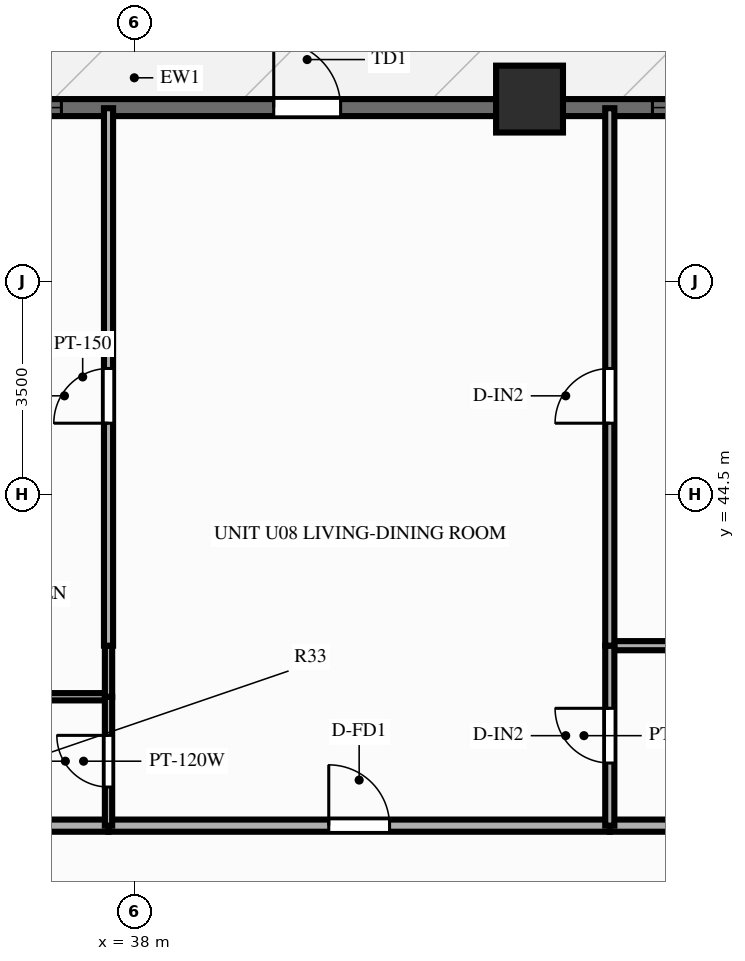
"""IFC4 building model, lengths in metres.
Left out: names, types, materials, properties, quantities, classifications, styles, units other than length and angle.
Written with IfcOpenShell. Run it as: python <this file> out.ifc"""

import sys

from ifc_helpers import new_model, si_unit, direction, frame, frame_2d, origin, origin_2d, place, context, subcontext, project, spatial, rectangle, extrude, source, transform, mapped, element, fill, save


model = new_model("IFC4")
c1 = context("Model", 3, precision=1e-05, world=origin(), true_north=direction((0.0, 1.0)))
c2 = subcontext(c1, "Body", "Model", "MODEL_VIEW")
j1 = project(units=[si_unit("LENGTHUNIT", "METRE"), si_unit("PLANEANGLEUNIT", "RADIAN")], contexts=[c1])
p1 = place(None, origin())
s1 = spatial("IfcSite", under=j1, at=p1, CompositionType="ELEMENT")
p2 = place(p1, origin())
s2 = spatial("IfcBuilding", under=s1, at=p2, CompositionType="ELEMENT")
p3 = place(p2, frame((0.0, 0.0, 61.4)))
s3 = spatial("IfcBuildingStorey", under=s2, at=p3, CompositionType="ELEMENT", Elevation=61.4)
m1 = source(origin(), c2, "Body", "SweptSolid", [
    extrude(rectangle(XDim=1.1, YDim=1.1, at=origin_2d()), origin(), (0.0, 0.0, 1.0), 3.0),
])
p4 = place(p3, frame((44.5, 51.0, 0.0), z_axis=(0.0, 0.0, 1.0), x_axis=(1.0, 0.0, 0.0)))
e1 = element("IfcColumn", 1, at=p4, inside=s3, PredefinedType="COLUMN", context=c2, shape_type="MappedRepresentation", body=[
    mapped(m1, transform((0.0, 0.0, 0.0), scale=1.0)),
])
p5 = place(p3, frame((15.5, 50.86, 0.0), z_axis=(0.0, 0.0, 1.0), x_axis=(1.0, 0.0, 0.0)))
e2 = element("IfcWall", 2, at=p5, inside=s3, PredefinedType="SOLIDWALL", context=c2, shape_type="SweptSolid", body=[
    extrude(rectangle(XDim=45.0, YDim=0.28, at=frame_2d((22.5, 0.0))), origin(), (0.0, 0.0, 1.0), 2.28),
])
p6 = place(p5, frame((0.76, 0.0, 0.25)))
e3 = element("IfcOpeningElement", 3, at=p6, cuts=e2, PredefinedType="OPENING", context=c2, shape_type="SweptSolid", body=[
    extrude(rectangle(XDim=1.2, YDim=1.5, at=frame_2d((0.6, 0.75))), frame((0.0, 0.152, 0.0), z_axis=(0.0, -1.0, 0.0), x_axis=(1.0, 0.0, 0.0)), (0.0, 0.0, 1.0), 0.304),
])
p7 = place(p5, frame((2.92, 0.0, 0.25)))
e4 = element("IfcOpeningElement", 4, at=p7, cuts=e2, PredefinedType="OPENING", context=c2, shape_type="SweptSolid", body=[
    extrude(rectangle(XDim=1.2, YDim=1.5, at=frame_2d((0.6, 0.75))), frame((0.0, 0.152, 0.0), z_axis=(0.0, -1.0, 0.0), x_axis=(1.0, 0.0, 0.0)), (0.0, 0.0, 1.0), 0.304),
])
p8 = place(p5, frame((5.554, 0.0, 0.25)))
e5 = element("IfcOpeningElement", 5, at=p8, cuts=e2, PredefinedType="OPENING", context=c2, shape_type="SweptSolid", body=[
    extrude(rectangle(XDim=1.2, YDim=1.5, at=frame_2d((0.6, 0.75))), frame((0.0, 0.152, 0.0), z_axis=(0.0, -1.0, 0.0), x_axis=(1.0, 0.0, 0.0)), (0.0, 0.0, 1.0), 0.304),
])
p9 = place(p5, frame((8.613, 0.0, 0.25)))
e6 = element("IfcOpeningElement", 6, at=p9, cuts=e2, PredefinedType="OPENING", context=c2, shape_type="SweptSolid", body=[
    extrude(rectangle(XDim=1.2, YDim=1.5, at=frame_2d((0.6, 0.75))), frame((0.0, 0.152, 0.0), z_axis=(0.0, -1.0, 0.0), x_axis=(1.0, 0.0, 0.0)), (0.0, 0.0, 1.0), 0.304),
])
p10 = place(p5, frame((11.418, 0.0, 0.25)))
e7 = element("IfcOpeningElement", 7, at=p10, cuts=e2, PredefinedType="OPENING", context=c2, shape_type="SweptSolid", body=[
    extrude(rectangle(XDim=1.2, YDim=1.5, at=frame_2d((0.6, 0.75))), frame((0.0, 0.152, 0.0), z_axis=(0.0, -1.0, 0.0), x_axis=(1.0, 0.0, 0.0)), (0.0, 0.0, 1.0), 0.304),
])
p11 = place(p5, frame((13.809, 0.0, 0.25)))
e8 = element("IfcOpeningElement", 8, at=p11, cuts=e2, PredefinedType="OPENING", context=c2, shape_type="SweptSolid", body=[
    extrude(rectangle(XDim=1.2, YDim=1.5, at=frame_2d((0.6, 0.75))), frame((0.0, 0.152, 0.0), z_axis=(0.0, -1.0, 0.0), x_axis=(1.0, 0.0, 0.0)), (0.0, 0.0, 1.0), 0.304),
])
p12 = place(p5, frame((17.258, 0.0, 0.25)))
e9 = element("IfcOpeningElement", 9, at=p12, cuts=e2, PredefinedType="OPENING", context=c2, shape_type="SweptSolid", body=[
    extrude(rectangle(XDim=1.2, YDim=1.5, at=frame_2d((0.6, 0.75))), frame((0.0, 0.152, 0.0), z_axis=(0.0, -1.0, 0.0), x_axis=(1.0, 0.0, 0.0)), (0.0, 0.0, 1.0), 0.304),
])
p13 = place(p5, frame((20.101, 0.0, 0.25)))
e10 = element("IfcOpeningElement", 10, at=p13, cuts=e2, PredefinedType="OPENING", context=c2, shape_type="SweptSolid", body=[
    extrude(rectangle(XDim=1.2, YDim=1.5, at=frame_2d((0.6, 0.75))), frame((0.0, 0.152, 0.0), z_axis=(0.0, -1.0, 0.0), x_axis=(1.0, 0.0, 0.0)), (0.0, 0.0, 1.0), 0.304),
])
p14 = place(p5, frame((24.793, 0.0, 0.0)))
e11 = element("IfcOpeningElement", 11, at=p14, cuts=e2, PredefinedType="OPENING", context=c2, shape_type="SweptSolid", body=[
    extrude(rectangle(XDim=1.1, YDim=2.15, at=frame_2d((0.55, 1.075))), frame((0.0, 0.152, 0.0), z_axis=(0.0, -1.0, 0.0), x_axis=(1.0, 0.0, 0.0)), (0.0, 0.0, 1.0), 0.304),
])
p15 = place(p5, frame((31.021, 0.0, 0.25)))
e12 = element("IfcOpeningElement", 12, at=p15, cuts=e2, PredefinedType="OPENING", context=c2, shape_type="SweptSolid", body=[
    extrude(rectangle(XDim=1.2, YDim=1.5, at=frame_2d((0.6, 0.75))), frame((0.0, 0.152, 0.0), z_axis=(0.0, -1.0, 0.0), x_axis=(1.0, 0.0, 0.0)), (0.0, 0.0, 1.0), 0.304),
])
p16 = place(p5, frame((33.869, 0.0, 0.25)))
e13 = element("IfcOpeningElement", 13, at=p16, cuts=e2, PredefinedType="OPENING", context=c2, shape_type="SweptSolid", body=[
    extrude(rectangle(XDim=1.2, YDim=1.5, at=frame_2d((0.6, 0.75))), frame((0.0, 0.152, 0.0), z_axis=(0.0, -1.0, 0.0), x_axis=(1.0, 0.0, 0.0)), (0.0, 0.0, 1.0), 0.304),
])
p17 = place(p5, frame((37.98, 0.0, 0.25)))
e14 = element("IfcOpeningElement", 14, at=p17, cuts=e2, PredefinedType="OPENING", context=c2, shape_type="SweptSolid", body=[
    extrude(rectangle(XDim=1.2, YDim=1.5, at=frame_2d((0.6, 0.75))), frame((0.0, 0.152, 0.0), z_axis=(0.0, -1.0, 0.0), x_axis=(1.0, 0.0, 0.0)), (0.0, 0.0, 1.0), 0.304),
])
p18 = place(p5, frame((42.277, 0.0, 0.25)))
e15 = element("IfcOpeningElement", 15, at=p18, cuts=e2, PredefinedType="OPENING", context=c2, shape_type="SweptSolid", body=[
    extrude(rectangle(XDim=1.2, YDim=1.5, at=frame_2d((0.6, 0.75))), frame((0.0, 0.152, 0.0), z_axis=(0.0, -1.0, 0.0), x_axis=(1.0, 0.0, 0.0)), (0.0, 0.0, 1.0), 0.304),
])
p19 = place(p3, frame((34.826, 39.05, 0.0), z_axis=(0.0, 0.0, 1.0), x_axis=(1.0, 0.0, 0.0)))
e16 = element("IfcWall", 16, at=p19, inside=s3, PredefinedType="PARTITIONING", context=c2, shape_type="SweptSolid", body=[
    extrude(rectangle(XDim=2.75, YDim=0.2, at=frame_2d((1.375, 0.0))), origin(), (0.0, 0.0, 1.0), 2.79),
])
p20 = place(p3, frame((37.576, 39.05, 0.0), z_axis=(0.0, 0.0, 1.0), x_axis=(1.0, 0.0, 0.0)))
e17 = element("IfcWall", 17, at=p20, inside=s3, PredefinedType="PARTITIONING", context=c2, shape_type="SweptSolid", body=[
    extrude(rectangle(XDim=8.244, YDim=0.2, at=frame_2d((4.122, 0.0))), origin(), (0.0, 0.0, 1.0), 2.79),
])
p21 = place(p20, frame((3.622, 0.0, 0.0)))
e18 = element("IfcOpeningElement", 18, at=p21, cuts=e17, PredefinedType="OPENING", context=c2, shape_type="SweptSolid", body=[
    extrude(rectangle(XDim=1.0, YDim=2.15, at=frame_2d((0.5, 1.075))), frame((0.0, 0.112, 0.0), z_axis=(0.0, -1.0, 0.0), x_axis=(1.0, 0.0, 0.0)), (0.0, 0.0, 1.0), 0.224),
])
p22 = place(p3, frame((45.82, 39.05, 0.0), z_axis=(0.0, 0.0, 1.0), x_axis=(1.0, 0.0, 0.0)))
e19 = element("IfcWall", 19, at=p22, inside=s3, PredefinedType="PARTITIONING", context=c2, shape_type="SweptSolid", body=[
    extrude(rectangle(XDim=2.603, YDim=0.2, at=frame_2d((1.301, 0.0))), origin(), (0.0, 0.0, 1.0), 2.79),
])
p23 = place(p3, frame((34.826, 41.17, 0.0), z_axis=(0.0, 0.0, 1.0), x_axis=(1.0, 0.0, 0.0)))
e20 = element("IfcWall", 20, at=p23, inside=s3, PredefinedType="PARTITIONING", context=c2, shape_type="SweptSolid", body=[
    extrude(rectangle(XDim=2.75, YDim=0.12, at=frame_2d((1.375, 0.0))), origin(), (0.0, 0.0, 1.0), 2.79),
])
p24 = place(p3, frame((45.82, 42.01, 0.0), z_axis=(0.0, 0.0, 1.0), x_axis=(1.0, 0.0, 0.0)))
e21 = element("IfcWall", 21, at=p24, inside=s3, PredefinedType="PARTITIONING", context=c2, shape_type="SweptSolid", body=[
    extrude(rectangle(XDim=2.603, YDim=0.15, at=frame_2d((1.301, 0.0))), origin(), (0.0, 0.0, 1.0), 2.79),
])
p25 = place(p3, frame((37.576, 39.05, 0.0), z_axis=(0.0, 0.0, 1.0), x_axis=(0.0, 1.0, 0.0)))
e22 = element("IfcWall", 22, at=p25, inside=s3, PredefinedType="PARTITIONING", context=c2, shape_type="SweptSolid", body=[
    extrude(rectangle(XDim=2.12, YDim=0.12, at=frame_2d((1.06, 0.0))), origin(), (0.0, 0.0, 1.0), 2.79),
])
p26 = place(p25, frame((0.635, 0.0, 0.0)))
e23 = element("IfcOpeningElement", 23, at=p26, cuts=e22, PredefinedType="OPENING", context=c2, shape_type="SweptSolid", body=[
    extrude(rectangle(XDim=0.85, YDim=2.05, at=frame_2d((0.425, 1.025))), frame((0.0, 0.072, 0.0), z_axis=(0.0, -1.0, 0.0), x_axis=(1.0, 0.0, 0.0)), (0.0, 0.0, 1.0), 0.144),
])
p27 = place(p3, frame((37.576, 41.17, 0.0), z_axis=(0.0, 0.0, 1.0), x_axis=(0.0, 1.0, 0.0)))
e24 = element("IfcWall", 24, at=p27, inside=s3, PredefinedType="PARTITIONING", context=c2, shape_type="SweptSolid", body=[
    extrude(rectangle(XDim=0.84, YDim=0.12, at=frame_2d((0.42, 0.0))), origin(), (0.0, 0.0, 1.0), 2.79),
])
p28 = place(p3, frame((37.576, 42.01, 0.0), z_axis=(0.0, 0.0, 1.0), x_axis=(0.0, 1.0, 0.0)))
e25 = element("IfcWall", 25, at=p28, inside=s3, PredefinedType="PARTITIONING", context=c2, shape_type="SweptSolid", body=[
    extrude(rectangle(XDim=8.84, YDim=0.15, at=frame_2d((4.42, 0.0))), origin(), (0.0, 0.0, 1.0), 2.79),
])
p29 = place(p28, frame((3.659, 0.0, 0.0)))
e26 = element("IfcOpeningElement", 26, at=p29, cuts=e25, PredefinedType="OPENING", context=c2, shape_type="SweptSolid", body=[
    extrude(rectangle(XDim=0.9, YDim=2.1, at=frame_2d((0.45, 1.05))), frame((0.0, 0.087, 0.0), z_axis=(0.0, -1.0, 0.0), x_axis=(1.0, 0.0, 0.0)), (0.0, 0.0, 1.0), 0.174),
])
p30 = place(p3, frame((45.82, 39.05, 0.0), z_axis=(0.0, 0.0, 1.0), x_axis=(0.0, 1.0, 0.0)))
e27 = element("IfcWall", 27, at=p30, inside=s3, PredefinedType="PARTITIONING", context=c2, shape_type="SweptSolid", body=[
    extrude(rectangle(XDim=2.96, YDim=0.15, at=frame_2d((1.48, 0.0))), origin(), (0.0, 0.0, 1.0), 2.79),
])
p31 = place(p30, frame((1.03, 0.0, 0.0)))
e28 = element("IfcOpeningElement", 28, at=p31, cuts=e27, PredefinedType="OPENING", context=c2, shape_type="SweptSolid", body=[
    extrude(rectangle(XDim=0.9, YDim=2.1, at=frame_2d((0.45, 1.05))), frame((0.0, 0.087, 0.0), z_axis=(0.0, -1.0, 0.0), x_axis=(1.0, 0.0, 0.0)), (0.0, 0.0, 1.0), 0.174),
])
p32 = place(p3, frame((45.82, 42.01, 0.0), z_axis=(0.0, 0.0, 1.0), x_axis=(0.0, 1.0, 0.0)))
e29 = element("IfcWall", 29, at=p32, inside=s3, PredefinedType="PARTITIONING", context=c2, shape_type="SweptSolid", body=[
    extrude(rectangle(XDim=8.84, YDim=0.15, at=frame_2d((4.42, 0.0))), origin(), (0.0, 0.0, 1.0), 2.79),
])
p33 = place(p32, frame((3.659, 0.0, 0.0)))
e30 = element("IfcOpeningElement", 30, at=p33, cuts=e29, PredefinedType="OPENING", context=c2, shape_type="SweptSolid", body=[
    extrude(rectangle(XDim=0.9, YDim=2.1, at=frame_2d((0.45, 1.05))), frame((0.0, 0.087, 0.0), z_axis=(0.0, -1.0, 0.0), x_axis=(1.0, 0.0, 0.0)), (0.0, 0.0, 1.0), 0.174),
])
m2 = source(origin(), c2, "Body", "SweptSolid", [
    extrude(rectangle(XDim=1.2, YDim=1.5, at=frame_2d((0.6, 0.75))), frame((0.0, 0.03, 0.0), z_axis=(0.0, -1.0, 0.0), x_axis=(1.0, 0.0, 0.0)), (0.0, 0.0, 1.0), 0.06),
])
p34 = place(p13, origin())
e31 = element("IfcWindow", 31, at=p34, inside=s3, PartitioningType="SINGLE_PANEL", PredefinedType="WINDOW", context=c2, shape_type="MappedRepresentation", body=[
    mapped(m2, transform((0.0, 0.0, 0.0), scale=1.0)),
])
fill(e10, e31)
m3 = source(origin(), c2, "Body", "SweptSolid", [
    extrude(rectangle(XDim=1.1, YDim=2.15, at=frame_2d((0.55, 1.075))), frame((0.0, 0.025, 0.0), z_axis=(0.0, -1.0, 0.0), x_axis=(1.0, 0.0, 0.0)), (0.0, 0.0, 1.0), 0.05),
])
p35 = place(p14, origin())
e32 = element("IfcDoor", 32, at=p35, inside=s3, OperationType="SINGLE_SWING_LEFT", PredefinedType="DOOR", context=c2, shape_type="MappedRepresentation", body=[
    mapped(m3, transform((0.0, 0.0, 0.0), scale=1.0)),
])
fill(e11, e32)
p36 = place(p15, origin())
e33 = element("IfcWindow", 33, at=p36, inside=s3, PartitioningType="SINGLE_PANEL", PredefinedType="WINDOW", context=c2, shape_type="MappedRepresentation", body=[
    mapped(m2, transform((0.0, 0.0, 0.0), scale=1.0)),
])
fill(e12, e33)
m4 = source(origin(), c2, "Body", "SweptSolid", [
    extrude(rectangle(XDim=1.0, YDim=2.15, at=frame_2d((0.5, 1.075))), frame((0.0, 0.025, 0.0), z_axis=(0.0, -1.0, 0.0), x_axis=(1.0, 0.0, 0.0)), (0.0, 0.0, 1.0), 0.05),
])
p37 = place(p21, origin())
e34 = element("IfcDoor", 34, at=p37, inside=s3, OperationType="SINGLE_SWING_LEFT", PredefinedType="DOOR", context=c2, shape_type="MappedRepresentation", body=[
    mapped(m4, transform((0.0, 0.0, 0.0), scale=1.0)),
])
fill(e18, e34)
m5 = source(origin(), c2, "Body", "SweptSolid", [
    extrude(rectangle(XDim=0.85, YDim=2.05, at=frame_2d((0.425, 1.025))), frame((0.0, 0.025, 0.0), z_axis=(0.0, -1.0, 0.0), x_axis=(1.0, 0.0, 0.0)), (0.0, 0.0, 1.0), 0.05),
])
p38 = place(p26, origin())
e35 = element("IfcDoor", 35, at=p38, inside=s3, OperationType="SINGLE_SWING_RIGHT", PredefinedType="DOOR", context=c2, shape_type="MappedRepresentation", body=[
    mapped(m5, transform((0.0, 0.0, 0.0), scale=1.0)),
])
fill(e23, e35)
m6 = source(origin(), c2, "Body", "SweptSolid", [
    extrude(rectangle(XDim=0.9, YDim=2.1, at=frame_2d((0.45, 1.05))), frame((0.0, 0.025, 0.0), z_axis=(0.0, -1.0, 0.0), x_axis=(1.0, 0.0, 0.0)), (0.0, 0.0, 1.0), 0.05),
])
p39 = place(p29, origin())
e36 = element("IfcDoor", 36, at=p39, inside=s3, OperationType="SINGLE_SWING_LEFT", PredefinedType="DOOR", context=c2, shape_type="MappedRepresentation", body=[
    mapped(m6, transform((0.0, 0.0, 0.0), scale=1.0)),
])
fill(e26, e36)
p40 = place(p31, origin())
e37 = element("IfcDoor", 37, at=p40, inside=s3, OperationType="SINGLE_SWING_RIGHT", PredefinedType="DOOR", context=c2, shape_type="MappedRepresentation", body=[
    mapped(m6, transform((0.0, 0.0, 0.0), scale=1.0)),
])
fill(e28, e37)
p41 = place(p33, origin())
e38 = element("IfcDoor", 38, at=p41, inside=s3, OperationType="SINGLE_SWING_LEFT", PredefinedType="DOOR", context=c2, shape_type="MappedRepresentation", body=[
    mapped(m6, transform((0.0, 0.0, 0.0), scale=1.0)),
])
fill(e30, e38)
save(model, sys.argv[1])
